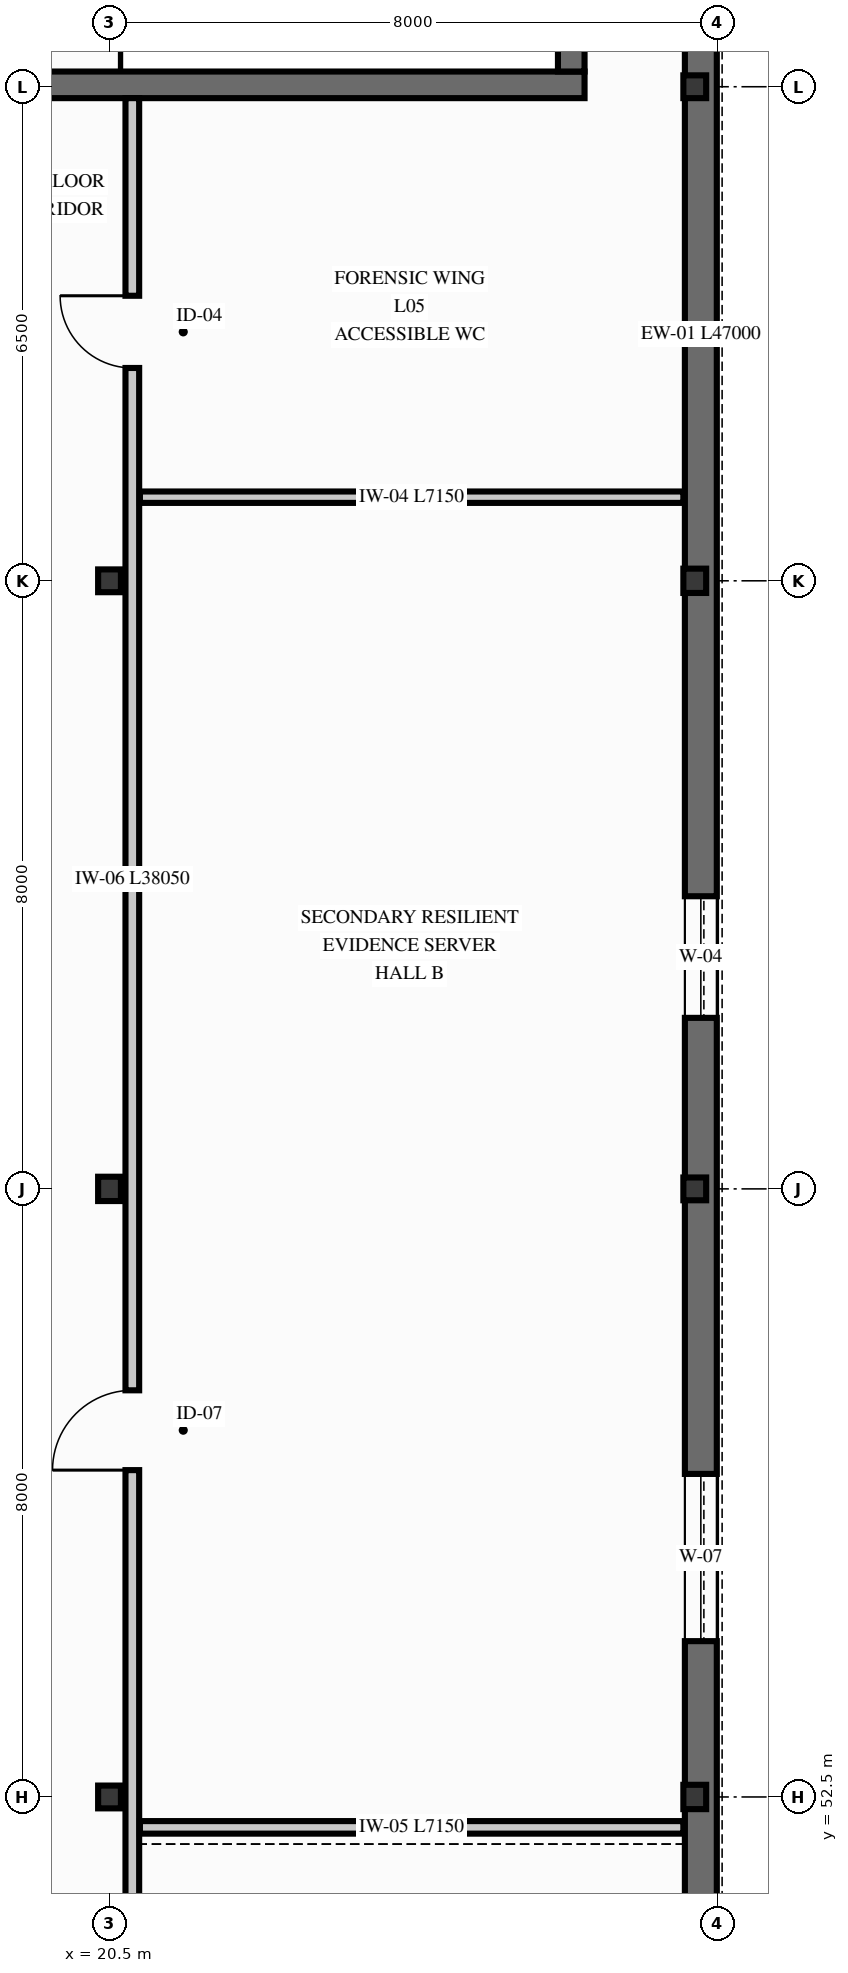
"""IFC4 building model, lengths in metres.
Left out: names, types, materials, properties, quantities, classifications, styles, units other than length and angle.
Written with IfcOpenShell. Run it as: python <this file> out.ifc"""

import sys

from ifc_helpers import new_model, si_unit, direction, frame, frame_2d, origin, origin_2d, place, context, subcontext, project, spatial, rectangle, i_section, extrude, element, fill, save


model = new_model("IFC4")
c1 = context("Model", 3, precision=1e-05, world=origin(), true_north=direction((0.0, 1.0)))
c2 = subcontext(c1, "Body", "Model", "MODEL_VIEW")
j1 = project(units=[si_unit("LENGTHUNIT", "METRE"), si_unit("PLANEANGLEUNIT", "RADIAN")], contexts=[c1])
p1 = place(None, origin())
s1 = spatial("IfcSite", under=j1, at=p1, CompositionType="ELEMENT")
p2 = place(p1, origin())
s2 = spatial("IfcBuilding", under=s1, at=p2, CompositionType="ELEMENT")
p3 = place(p2, frame((0.0, 0.0, 21.6)))
s3 = spatial("IfcBuildingStorey", under=s2, at=p3, CompositionType="ELEMENT", Elevation=21.6)
p4 = place(p3, frame((18.45, 75.025, 0.0), z_axis=(0.0, 0.0, 1.0), x_axis=(1.0, 0.0, 0.0)))
e1 = element("IfcWall", 1, at=p4, inside=s3, PredefinedType="SHEAR", context=c2, shape_type="SweptSolid", body=[
    extrude(rectangle(XDim=8.3, YDim=0.35, at=frame_2d((4.15, 0.0))), origin(), (0.0, 0.0, 1.0), 3.66),
])
p5 = place(p3, frame((26.575, 75.2, 0.0), z_axis=(0.0, 0.0, 1.0), x_axis=(0.0, 1.0, 0.0)))
e2 = element("IfcWall", 2, at=p5, inside=s3, PredefinedType="SHEAR", context=c2, shape_type="SweptSolid", body=[
    extrude(rectangle(XDim=6.8, YDim=0.35, at=frame_2d((3.4, 0.0))), origin(), (0.0, 0.0, 1.0), 3.66),
])
p6 = place(p3, frame((20.5, 52.5, 0.0), z_axis=(0.0, 0.0, 1.0), x_axis=(1.0, 0.0, 0.0)))
e3 = element("IfcColumn", 3, at=p6, inside=s3, PredefinedType="COLUMN", context=c2, shape_type="SweptSolid", body=[
    extrude(i_section(OverallWidth=0.3, OverallDepth=0.3, WebThickness=0.011, FlangeThickness=0.019, FilletRadius=0.027, at=origin_2d()), origin(), (0.0, 0.0, 1.0), 3.68),
])
p7 = place(p3, frame((20.5, 60.5, 0.0), z_axis=(0.0, 0.0, 1.0), x_axis=(1.0, 0.0, 0.0)))
e4 = element("IfcColumn", 4, at=p7, inside=s3, PredefinedType="COLUMN", context=c2, shape_type="SweptSolid", body=[
    extrude(i_section(OverallWidth=0.3, OverallDepth=0.32, WebThickness=0.011, FlangeThickness=0.021, FilletRadius=0.027, at=origin_2d()), origin(), (0.0, 0.0, 1.0), 3.68),
])
p8 = place(p3, frame((20.5, 68.5, 0.0), z_axis=(0.0, 0.0, 1.0), x_axis=(1.0, 0.0, 0.0)))
e5 = element("IfcColumn", 5, at=p8, inside=s3, PredefinedType="COLUMN", context=c2, shape_type="SweptSolid", body=[
    extrude(i_section(OverallWidth=0.3, OverallDepth=0.3, WebThickness=0.011, FlangeThickness=0.019, FilletRadius=0.027, at=origin_2d()), origin(), (0.0, 0.0, 1.0), 3.68),
])
p9 = place(p3, frame((28.2, 52.5, 0.0), z_axis=(0.0, 0.0, 1.0), x_axis=(1.0, 0.0, 0.0)))
e6 = element("IfcColumn", 6, at=p9, inside=s3, PredefinedType="COLUMN", context=c2, shape_type="SweptSolid", body=[
    extrude(i_section(OverallWidth=0.3, OverallDepth=0.32, WebThickness=0.011, FlangeThickness=0.021, FilletRadius=0.027, at=origin_2d()), origin(), (0.0, 0.0, 1.0), 3.68),
])
p10 = place(p3, frame((28.2, 60.5, 0.0), z_axis=(0.0, 0.0, 1.0), x_axis=(1.0, 0.0, 0.0)))
e7 = element("IfcColumn", 7, at=p10, inside=s3, PredefinedType="COLUMN", context=c2, shape_type="SweptSolid", body=[
    extrude(i_section(OverallWidth=0.3, OverallDepth=0.3, WebThickness=0.011, FlangeThickness=0.019, FilletRadius=0.027, at=origin_2d()), origin(), (0.0, 0.0, 1.0), 3.68),
])
p11 = place(p3, frame((28.2, 68.5, 0.0), z_axis=(0.0, 0.0, 1.0), x_axis=(1.0, 0.0, 0.0)))
e8 = element("IfcColumn", 8, at=p11, inside=s3, PredefinedType="COLUMN", context=c2, shape_type="SweptSolid", body=[
    extrude(i_section(OverallWidth=0.3, OverallDepth=0.32, WebThickness=0.011, FlangeThickness=0.021, FilletRadius=0.027, at=origin_2d()), origin(), (0.0, 0.0, 1.0), 3.68),
])
p12 = place(p3, frame((28.2, 75.0, 0.0), z_axis=(0.0, 0.0, 1.0), x_axis=(1.0, 0.0, 0.0)))
e9 = element("IfcColumn", 9, at=p12, inside=s3, PredefinedType="COLUMN", context=c2, shape_type="SweptSolid", body=[
    extrude(i_section(OverallWidth=0.3, OverallDepth=0.3, WebThickness=0.011, FlangeThickness=0.019, FilletRadius=0.027, at=origin_2d()), origin(), (0.0, 0.0, 1.0), 3.68),
])
p13 = place(p3, frame((28.28, 36.5, 0.0), z_axis=(0.0, 0.0, 1.0), x_axis=(0.0, 1.0, 0.0)))
e10 = element("IfcWall", 10, at=p13, inside=s3, PredefinedType="SOLIDWALL", context=c2, shape_type="SweptSolid", body=[
    extrude(rectangle(XDim=47.0, YDim=0.42, at=frame_2d((23.5, 0.0))), origin(), (0.0, 0.0, 1.0), 3.78),
])
p14 = place(p13, frame((1.65, 0.0, 0.74)))
e11 = element("IfcOpeningElement", 11, at=p14, cuts=e10, PredefinedType="OPENING", context=c2, shape_type="SweptSolid", body=[
    extrude(rectangle(XDim=1.6, YDim=2.4, at=frame_2d((0.8, 1.2))), frame((0.0, 0.22, 0.0), z_axis=(0.0, -1.0, 0.0), x_axis=(1.0, 0.0, 0.0)), (0.0, 0.0, 1.0), 0.44),
])
p15 = place(p13, frame((5.75, 0.0, 0.74)))
e12 = element("IfcOpeningElement", 12, at=p15, cuts=e10, PredefinedType="OPENING", context=c2, shape_type="SweptSolid", body=[
    extrude(rectangle(XDim=1.8, YDim=2.4, at=frame_2d((0.9, 1.2))), frame((0.0, 0.22, 0.0), z_axis=(0.0, -1.0, 0.0), x_axis=(1.0, 0.0, 0.0)), (0.0, 0.0, 1.0), 0.44),
])
p16 = place(p13, frame((9.85, 0.0, 0.84)))
e13 = element("IfcOpeningElement", 13, at=p16, cuts=e10, PredefinedType="OPENING", context=c2, shape_type="SweptSolid", body=[
    extrude(rectangle(XDim=1.5, YDim=2.3, at=frame_2d((0.75, 1.15))), frame((0.0, 0.22, 0.0), z_axis=(0.0, -1.0, 0.0), x_axis=(1.0, 0.0, 0.0)), (0.0, 0.0, 1.0), 0.44),
])
p17 = place(p13, frame((18.05, 0.0, 0.54)))
e14 = element("IfcOpeningElement", 14, at=p17, cuts=e10, PredefinedType="OPENING", context=c2, shape_type="SweptSolid", body=[
    extrude(rectangle(XDim=2.2, YDim=2.6, at=frame_2d((1.1, 1.3))), frame((0.0, 0.22, 0.0), z_axis=(0.0, -1.0, 0.0), x_axis=(1.0, 0.0, 0.0)), (0.0, 0.0, 1.0), 0.44),
])
p18 = place(p13, frame((26.25, 0.0, 0.74)))
e15 = element("IfcOpeningElement", 15, at=p18, cuts=e10, PredefinedType="OPENING", context=c2, shape_type="SweptSolid", body=[
    extrude(rectangle(XDim=1.6, YDim=2.4, at=frame_2d((0.8, 1.2))), frame((0.0, 0.22, 0.0), z_axis=(0.0, -1.0, 0.0), x_axis=(1.0, 0.0, 0.0)), (0.0, 0.0, 1.0), 0.44),
])
p19 = place(p13, frame((42.65, 0.0, 0.54)))
e16 = element("IfcOpeningElement", 16, at=p19, cuts=e10, PredefinedType="OPENING", context=c2, shape_type="SweptSolid", body=[
    extrude(rectangle(XDim=2.2, YDim=2.6, at=frame_2d((1.1, 1.3))), frame((0.0, 0.22, 0.0), z_axis=(0.0, -1.0, 0.0), x_axis=(1.0, 0.0, 0.0)), (0.0, 0.0, 1.0), 0.44),
])
p20 = place(p3, frame((20.8, 36.8, 0.0), z_axis=(0.0, 0.0, 1.0), x_axis=(0.0, 1.0, 0.0)))
e17 = element("IfcWall", 17, at=p20, inside=s3, PredefinedType="PARTITIONING", context=c2, shape_type="SweptSolid", body=[
    extrude(rectangle(XDim=38.05, YDim=0.18, at=frame_2d((19.025, 0.0))), origin(), (0.0, 0.0, 1.0), 3.62),
])
p21 = place(p20, frame((5.65, 0.0, 0.0)))
e18 = element("IfcOpeningElement", 18, at=p21, cuts=e17, PredefinedType="OPENING", context=c2, shape_type="SweptSolid", body=[
    extrude(rectangle(XDim=1.08, YDim=2.22, at=frame_2d((0.54, 1.11))), frame((0.0, 0.1, 0.0), z_axis=(0.0, -1.0, 0.0), x_axis=(1.0, 0.0, 0.0)), (0.0, 0.0, 1.0), 0.2),
])
p22 = place(p20, frame((20.0, 0.0, 0.0)))
e19 = element("IfcOpeningElement", 19, at=p22, cuts=e17, PredefinedType="OPENING", context=c2, shape_type="SweptSolid", body=[
    extrude(rectangle(XDim=1.05, YDim=2.2, at=frame_2d((0.525, 1.1))), frame((0.0, 0.1, 0.0), z_axis=(0.0, -1.0, 0.0), x_axis=(1.0, 0.0, 0.0)), (0.0, 0.0, 1.0), 0.2),
])
p23 = place(p20, frame((34.5, 0.0, 0.0)))
e20 = element("IfcOpeningElement", 20, at=p23, cuts=e17, PredefinedType="OPENING", context=c2, shape_type="SweptSolid", body=[
    extrude(rectangle(XDim=0.95, YDim=2.15, at=frame_2d((0.475, 1.075))), frame((0.0, 0.1, 0.0), z_axis=(0.0, -1.0, 0.0), x_axis=(1.0, 0.0, 0.0)), (0.0, 0.0, 1.0), 0.2),
])
p24 = place(p3, frame((20.9, 52.1, 0.0), z_axis=(0.0, 0.0, 1.0), x_axis=(1.0, 0.0, 0.0)))
e21 = element("IfcWall", 21, at=p24, inside=s3, PredefinedType="PARTITIONING", context=c2, shape_type="SweptSolid", body=[
    extrude(rectangle(XDim=7.15, YDim=0.165, at=frame_2d((3.575, 0.0))), origin(), (0.0, 0.0, 1.0), 3.62),
])
p25 = place(p3, frame((20.9, 69.6, 0.0), z_axis=(0.0, 0.0, 1.0), x_axis=(1.0, 0.0, 0.0)))
e22 = element("IfcWall", 22, at=p25, inside=s3, PredefinedType="PARTITIONING", context=c2, shape_type="SweptSolid", body=[
    extrude(rectangle(XDim=7.15, YDim=0.15, at=frame_2d((3.575, 0.0))), origin(), (0.0, 0.0, 1.0), 3.62),
])
p26 = place(p17, origin())
e23 = element("IfcWindow", 23, at=p26, inside=s3, PartitioningType="SINGLE_PANEL", PredefinedType="WINDOW", context=c2, shape_type="SweptSolid", body=[
    extrude(rectangle(XDim=2.2, YDim=2.6, at=frame_2d((1.1, 1.3))), frame((0.0, 0.03, 0.0), z_axis=(0.0, -1.0, 0.0), x_axis=(1.0, 0.0, 0.0)), (0.0, 0.0, 1.0), 0.06),
])
fill(e14, e23)
p27 = place(p18, origin())
e24 = element("IfcWindow", 24, at=p27, inside=s3, PartitioningType="SINGLE_PANEL", PredefinedType="WINDOW", context=c2, shape_type="SweptSolid", body=[
    extrude(rectangle(XDim=1.6, YDim=2.4, at=frame_2d((0.8, 1.2))), frame((0.0, 0.03, 0.0), z_axis=(0.0, -1.0, 0.0), x_axis=(1.0, 0.0, 0.0)), (0.0, 0.0, 1.0), 0.06),
])
fill(e15, e24)
p28 = place(p22, origin())
e25 = element("IfcDoor", 25, at=p28, inside=s3, OperationType="SINGLE_SWING_LEFT", PredefinedType="DOOR", context=c2, shape_type="SweptSolid", body=[
    extrude(rectangle(XDim=1.05, YDim=2.2, at=frame_2d((0.525, 1.1))), frame((0.0, 0.025, 0.0), z_axis=(0.0, -1.0, 0.0), x_axis=(1.0, 0.0, 0.0)), (0.0, 0.0, 1.0), 0.05),
])
fill(e19, e25)
p29 = place(p23, origin())
e26 = element("IfcDoor", 26, at=p29, inside=s3, OperationType="SINGLE_SWING_RIGHT", PredefinedType="DOOR", context=c2, shape_type="SweptSolid", body=[
    extrude(rectangle(XDim=0.95, YDim=2.15, at=frame_2d((0.475, 1.075))), frame((0.0, 0.025, 0.0), z_axis=(0.0, -1.0, 0.0), x_axis=(1.0, 0.0, 0.0)), (0.0, 0.0, 1.0), 0.05),
])
fill(e20, e26)
save(model, sys.argv[1])
